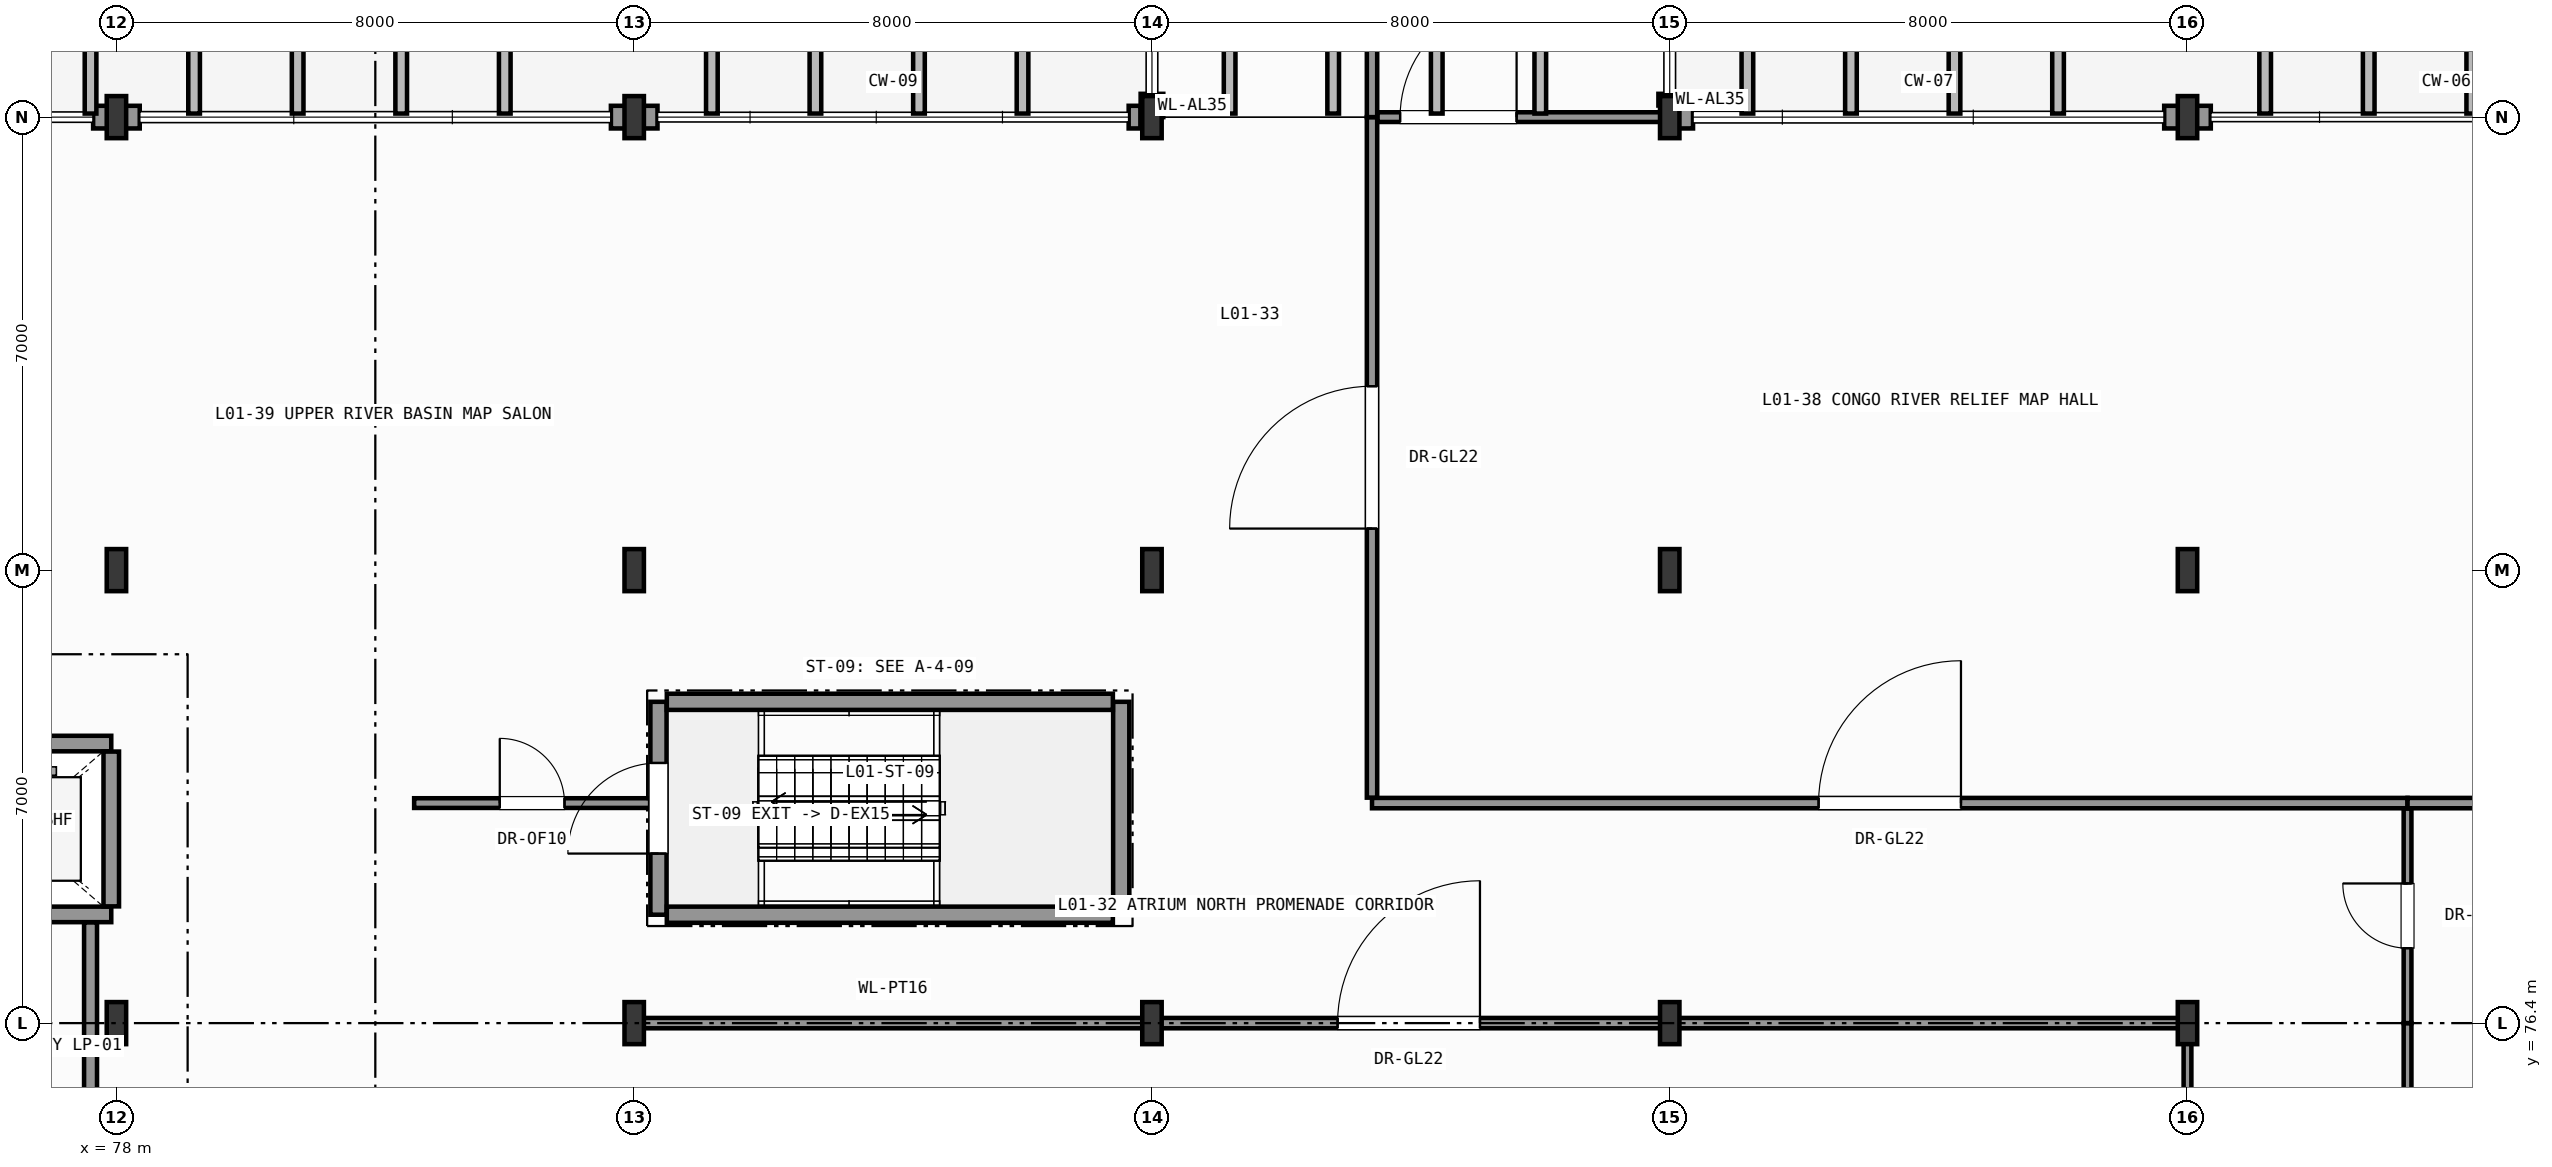
"""IFC4 building model, lengths in metres.
Left out: names, types, materials, properties, quantities, classifications, styles, units other than length and angle.
Written with IfcOpenShell. Run it as: python <this file> out.ifc"""

import sys

from ifc_helpers import new_model, si_unit, direction, frame, frame_2d, origin, origin_2d, place, context, subcontext, project, spatial, rectangle, i_section, extrude, element, fill, save


model = new_model("IFC4")
c1 = context("Model", 3, precision=1e-05, world=origin(), true_north=direction((0.0, 1.0)))
c2 = subcontext(c1, "Body", "Model", "MODEL_VIEW")
j1 = project(units=[si_unit("LENGTHUNIT", "METRE"), si_unit("PLANEANGLEUNIT", "RADIAN")], contexts=[c1])
p1 = place(None, origin())
s1 = spatial("IfcSite", under=j1, at=p1, CompositionType="ELEMENT")
p2 = place(p1, origin())
s2 = spatial("IfcBuilding", under=s1, at=p2, CompositionType="ELEMENT")
p3 = place(p2, origin())
s3 = spatial("IfcBuildingStorey", under=s2, at=p3, CompositionType="ELEMENT", Elevation=0.0)
for number, where, z_axis, x_axis in (
    (1, (78.0, 76.4, 0.0), (0.0, 0.0, 1.0), (1.0, 0.0, 0.0)),
    (2, (78.0, 83.4, 0.0), (0.0, 0.0, 1.0), (1.0, 0.0, 0.0)),
    (3, (78.0, 90.4, 0.0), (0.0, 0.0, 1.0), (1.0, 0.0, 0.0)),
    (4, (86.0, 76.4, 0.0), (0.0, 0.0, 1.0), (1.0, 0.0, 0.0)),
    (5, (86.0, 83.4, 0.0), (0.0, 0.0, 1.0), (1.0, 0.0, 0.0)),
    (6, (86.0, 90.4, 0.0), (0.0, 0.0, 1.0), (1.0, 0.0, 0.0)),
    (7, (94.0, 76.4, 0.0), (0.0, 0.0, 1.0), (1.0, 0.0, 0.0)),
    (8, (94.0, 83.4, 0.0), (0.0, 0.0, 1.0), (1.0, 0.0, 0.0)),
    (9, (94.0, 90.4, 0.0), (0.0, 0.0, 1.0), (1.0, 0.0, 0.0)),
    (10, (102.0, 76.4, 0.0), (0.0, 0.0, 1.0), (1.0, 0.0, 0.0)),
    (11, (102.0, 83.4, 0.0), (0.0, 0.0, 1.0), (1.0, 0.0, 0.0)),
    (12, (102.0, 90.4, 0.0), (0.0, 0.0, 1.0), (1.0, 0.0, 0.0)),
    (13, (110.0, 76.4, 0.0), (0.0, 0.0, 1.0), (1.0, 0.0, 0.0)),
    (14, (110.0, 83.4, 0.0), (0.0, 0.0, 1.0), (1.0, 0.0, 0.0)),
    (15, (110.0, 90.4, 0.0), (0.0, 0.0, 1.0), (1.0, 0.0, 0.0)),
):
    element("IfcColumn", number, at=place(p3, frame(where, z_axis=z_axis, x_axis=x_axis)), inside=s3, PredefinedType="COLUMN", context=c2, shape_type="SweptSolid", body=[
        extrude(i_section(OverallWidth=0.3, OverallDepth=0.65, WebThickness=0.016, FlangeThickness=0.031, FilletRadius=0.027, at=origin_2d()), origin(), (0.0, 0.0, 1.0), 7.8),
    ])
for number, where, z_axis, x_axis in (
    (16, (110.36, 90.4, 0.0), (0.0, 0.0, 1.0), (-1.0, 0.0, 0.0)),
    (17, (110.0, 90.4, 0.0), (0.0, 0.0, 1.0), (-1.0, 0.0, 0.0)),
    (18, (102.36, 90.4, 0.0), (0.0, 0.0, 1.0), (-1.0, 0.0, 0.0)),
):
    element("IfcWall", number, at=place(p3, frame(where, z_axis=z_axis, x_axis=x_axis)), inside=s3, PredefinedType="SOLIDWALL", context=c2, shape_type="SweptSolid", body=[
        extrude(rectangle(XDim=0.36, YDim=0.35, at=frame_2d((0.18, 0.0))), origin(), (0.0, 0.0, 1.0), 7.135),
    ])
p4 = place(p3, frame((102.0, 90.579, 0.0), z_axis=(0.0, 0.0, 1.0), x_axis=(0.0, 1.0, 0.0)))
e19 = element("IfcWall", 19, at=p4, inside=s3, PredefinedType="SOLIDWALL", context=c2, shape_type="SweptSolid", body=[
    extrude(rectangle(XDim=0.181, YDim=0.35, at=frame_2d((0.09, 0.0))), origin(), (0.0, 0.0, 1.0), 7.54),
])
p5 = place(p3, frame((94.0, 90.76, 0.0), z_axis=(0.0, 0.0, 1.0), x_axis=(0.0, -1.0, 0.0)))
e20 = element("IfcWall", 20, at=p5, inside=s3, PredefinedType="SOLIDWALL", context=c2, shape_type="SweptSolid", body=[
    extrude(rectangle(XDim=0.36, YDim=0.35, at=frame_2d((0.18, 0.0))), origin(), (0.0, 0.0, 1.0), 7.025),
])
p6 = place(p3, frame((93.821, 90.4, 0.0), z_axis=(0.0, 0.0, 1.0), x_axis=(-1.0, 0.0, 0.0)))
e21 = element("IfcWall", 21, at=p6, inside=s3, PredefinedType="SOLIDWALL", context=c2, shape_type="SweptSolid", body=[
    extrude(rectangle(XDim=0.181, YDim=0.35, at=frame_2d((0.091, 0.0))), origin(), (0.0, 0.0, 1.0), 7.54),
])
for number, where, z_axis, x_axis in (
    (22, (86.36, 90.4, 0.0), (0.0, 0.0, 1.0), (-1.0, 0.0, 0.0)),
    (23, (86.0, 90.4, 0.0), (0.0, 0.0, 1.0), (-1.0, 0.0, 0.0)),
    (24, (78.36, 90.4, 0.0), (0.0, 0.0, 1.0), (-1.0, 0.0, 0.0)),
    (25, (78.0, 90.4, 0.0), (0.0, 0.0, 1.0), (-1.0, 0.0, 0.0)),
):
    element("IfcWall", number, at=place(p3, frame(where, z_axis=z_axis, x_axis=x_axis)), inside=s3, PredefinedType="SOLIDWALL", context=c2, shape_type="SweptSolid", body=[
        extrude(rectangle(XDim=0.36, YDim=0.35, at=frame_2d((0.18, 0.0))), origin(), (0.0, 0.0, 1.0), 7.135),
    ])
p7 = place(p3, frame((86.375, 78.075, 0.0), z_axis=(0.0, 0.0, 1.0), x_axis=(0.0, 1.0, 0.0)))
e26 = element("IfcWall", 26, at=p7, inside=s3, PredefinedType="SHEAR", context=c2, shape_type="SweptSolid", body=[
    extrude(rectangle(XDim=3.29, YDim=0.25, at=frame_2d((1.645, 0.0))), origin(), (0.0, 0.0, 1.0), 7.54),
])
p8 = place(p7, frame((0.945, 0.0, 0.0)))
e27 = element("IfcOpeningElement", 27, at=p8, cuts=e26, PredefinedType="OPENING", context=c2, shape_type="SweptSolid", body=[
    extrude(rectangle(XDim=1.4, YDim=2.2, at=frame_2d((0.7, 1.1))), frame((0.0, 0.135, 0.0), z_axis=(0.0, -1.0, 0.0), x_axis=(1.0, 0.0, 0.0)), (0.0, 0.0, 1.0), 0.27),
])
p9 = place(p3, frame((93.525, 78.075, 0.0), z_axis=(0.0, 0.0, 1.0), x_axis=(0.0, 1.0, 0.0)))
e28 = element("IfcWall", 28, at=p9, inside=s3, PredefinedType="SHEAR", context=c2, shape_type="SweptSolid", body=[
    extrude(rectangle(XDim=3.29, YDim=0.25, at=frame_2d((1.645, 0.0))), origin(), (0.0, 0.0, 1.0), 7.54),
])
for number, where, z_axis, x_axis in (
    (29, (86.504, 78.075, 0.0), (0.0, 0.0, 1.0), (1.0, 0.0, 0.0)),
    (30, (86.504, 81.365, 0.0), (0.0, 0.0, 1.0), (1.0, 0.0, 0.0)),
):
    element("IfcWall", number, at=place(p3, frame(where, z_axis=z_axis, x_axis=x_axis)), inside=s3, PredefinedType="SHEAR", context=c2, shape_type="SweptSolid", body=[
        extrude(rectangle(XDim=6.892, YDim=0.25, at=frame_2d((3.446, 0.0))), origin(), (0.0, 0.0, 1.0), 7.54),
    ])
p10 = place(p3, frame((74.88, 78.08, 0.0), z_axis=(0.0, 0.0, 1.0), x_axis=(1.0, 0.0, 0.0)))
e31 = element("IfcWall", 31, at=p10, inside=s3, PredefinedType="SHEAR", context=c2, shape_type="SweptSolid", body=[
    extrude(rectangle(XDim=3.04, YDim=0.24, at=frame_2d((1.52, 0.0))), origin(), (0.0, 0.0, 1.0), 7.54),
])
p11 = place(p10, frame((0.97, 0.0, 0.0)))
e32 = element("IfcOpeningElement", 32, at=p11, cuts=e31, PredefinedType="OPENING", context=c2, shape_type="SweptSolid", body=[
    extrude(rectangle(XDim=1.1, YDim=2.2, at=frame_2d((0.55, 1.1))), frame((0.0, 0.13, 0.0), z_axis=(0.0, -1.0, 0.0), x_axis=(1.0, 0.0, 0.0)), (0.0, 0.0, 1.0), 0.26),
])
p12 = place(p3, frame((74.88, 80.72, 0.0), z_axis=(0.0, 0.0, 1.0), x_axis=(1.0, 0.0, 0.0)))
e33 = element("IfcWall", 33, at=p12, inside=s3, PredefinedType="SHEAR", context=c2, shape_type="SweptSolid", body=[
    extrude(rectangle(XDim=3.04, YDim=0.24, at=frame_2d((1.52, 0.0))), origin(), (0.0, 0.0, 1.0), 7.54),
])
p13 = place(p3, frame((77.92, 78.204, 0.0), z_axis=(0.0, 0.0, 1.0), x_axis=(0.0, 1.0, 0.0)))
e34 = element("IfcWall", 34, at=p13, inside=s3, PredefinedType="SHEAR", context=c2, shape_type="SweptSolid", body=[
    extrude(rectangle(XDim=2.392, YDim=0.24, at=frame_2d((1.196, 0.0))), origin(), (0.0, 0.0, 1.0), 7.54),
])
p14 = place(p3, frame((77.6, 74.304, 0.0), z_axis=(0.0, 0.0, 1.0), x_axis=(0.0, 1.0, 0.0)))
e35 = element("IfcWall", 35, at=p14, inside=s3, PredefinedType="PARTITIONING", context=c2, shape_type="SweptSolid", body=[
    extrude(rectangle(XDim=3.652, YDim=0.2, at=frame_2d((1.826, 0.0))), origin(), (0.0, 0.0, 1.0), 7.54),
])
p15 = place(p3, frame((110.0, 59.679, 0.0), z_axis=(0.0, 0.0, 1.0), x_axis=(0.0, 1.0, 0.0)))
e36 = element("IfcWall", 36, at=p15, inside=s3, PredefinedType="PARTITIONING", context=c2, shape_type="SweptSolid", body=[
    extrude(rectangle(XDim=16.721, YDim=0.12, at=frame_2d((8.36, 0.0))), origin(), (0.0, 0.0, 1.0), 7.085),
])
p16 = place(p15, frame((1.768, 0.0, 0.0)))
e37 = element("IfcOpeningElement", 37, at=p16, cuts=e36, PredefinedType="OPENING", context=c2, shape_type="SweptSolid", body=[
    extrude(rectangle(XDim=2.2, YDim=2.6, at=frame_2d((1.1, 1.3))), frame((0.0, 0.07, 0.0), z_axis=(0.0, -1.0, 0.0), x_axis=(1.0, 0.0, 0.0)), (0.0, 0.0, 1.0), 0.14),
])
p17 = place(p3, frame((86.0, 76.4, 0.0), z_axis=(0.0, 0.0, 1.0), x_axis=(1.0, 0.0, 0.0)))
e38 = element("IfcWall", 38, at=p17, inside=s3, PredefinedType="PARTITIONING", context=c2, shape_type="SweptSolid", body=[
    extrude(rectangle(XDim=23.936, YDim=0.16, at=frame_2d((11.968, 0.0))), origin(), (0.0, 0.0, 1.0), 7.135),
])
p18 = place(p17, frame((10.868, 0.0, 0.0)))
e39 = element("IfcOpeningElement", 39, at=p18, cuts=e38, PredefinedType="OPENING", context=c2, shape_type="SweptSolid", body=[
    extrude(rectangle(XDim=2.2, YDim=2.6, at=frame_2d((1.1, 1.3))), frame((0.0, 0.09, 0.0), z_axis=(0.0, -1.0, 0.0), x_axis=(1.0, 0.0, 0.0)), (0.0, 0.0, 1.0), 0.18),
])
p19 = place(p3, frame((113.4, 71.6, 0.0), z_axis=(0.0, 0.0, 1.0), x_axis=(0.0, 1.0, 0.0)))
e40 = element("IfcWall", 40, at=p19, inside=s3, PredefinedType="PARTITIONING", context=c2, shape_type="SweptSolid", body=[
    extrude(rectangle(XDim=4.8, YDim=0.12, at=frame_2d((2.4, 0.0))), origin(), (0.0, 0.0, 1.0), 7.54),
])
p20 = place(p19, frame((1.5, 0.0, 0.0)))
e41 = element("IfcOpeningElement", 41, at=p20, cuts=e40, PredefinedType="OPENING", context=c2, shape_type="SweptSolid", body=[
    extrude(rectangle(XDim=1.8, YDim=2.4, at=frame_2d((0.9, 1.2))), frame((0.0, 0.07, 0.0), z_axis=(0.0, -1.0, 0.0), x_axis=(1.0, 0.0, 0.0)), (0.0, 0.0, 1.0), 0.14),
])
p21 = place(p3, frame((97.4, 79.8, 0.0), z_axis=(0.0, 0.0, 1.0), x_axis=(1.0, 0.0, 0.0)))
e42 = element("IfcWall", 42, at=p21, inside=s3, PredefinedType="PARTITIONING", context=c2, shape_type="SweptSolid", body=[
    extrude(rectangle(XDim=16.0, YDim=0.16, at=frame_2d((8.0, 0.0))), origin(), (0.0, 0.0, 1.0), 7.165),
])
p22 = place(p21, frame((6.9, 0.0, 0.0)))
e43 = element("IfcOpeningElement", 43, at=p22, cuts=e42, PredefinedType="OPENING", context=c2, shape_type="SweptSolid", body=[
    extrude(rectangle(XDim=2.2, YDim=2.6, at=frame_2d((1.1, 1.3))), frame((0.0, 0.09, 0.0), z_axis=(0.0, -1.0, 0.0), x_axis=(1.0, 0.0, 0.0)), (0.0, 0.0, 1.0), 0.18),
])
p23 = place(p3, frame((82.6, 79.8, 0.0), z_axis=(0.0, 0.0, 1.0), x_axis=(1.0, 0.0, 0.0)))
e44 = element("IfcWall", 44, at=p23, inside=s3, PredefinedType="PARTITIONING", context=c2, shape_type="SweptSolid", body=[
    extrude(rectangle(XDim=3.646, YDim=0.15, at=frame_2d((1.823, 0.0))), origin(), (0.0, 0.0, 1.0), 7.195),
])
p24 = place(p23, frame((1.323, 0.0, 0.0)))
e45 = element("IfcOpeningElement", 45, at=p24, cuts=e44, PredefinedType="OPENING", context=c2, shape_type="SweptSolid", body=[
    extrude(rectangle(XDim=1.0, YDim=2.15, at=frame_2d((0.5, 1.075))), frame((0.0, 0.085, 0.0), z_axis=(0.0, -1.0, 0.0), x_axis=(1.0, 0.0, 0.0)), (0.0, 0.0, 1.0), 0.17),
])
p25 = place(p3, frame((113.4, 76.4, 0.0), z_axis=(0.0, 0.0, 1.0), x_axis=(0.0, 1.0, 0.0)))
e46 = element("IfcWall", 46, at=p25, inside=s3, PredefinedType="PARTITIONING", context=c2, shape_type="SweptSolid", body=[
    extrude(rectangle(XDim=3.316, YDim=0.12, at=frame_2d((1.658, 0.0))), origin(), (0.0, 0.0, 1.0), 7.54),
])
p26 = place(p25, frame((1.158, 0.0, 0.0)))
e47 = element("IfcOpeningElement", 47, at=p26, cuts=e46, PredefinedType="OPENING", context=c2, shape_type="SweptSolid", body=[
    extrude(rectangle(XDim=1.0, YDim=2.15, at=frame_2d((0.5, 1.075))), frame((0.0, 0.07, 0.0), z_axis=(0.0, -1.0, 0.0), x_axis=(1.0, 0.0, 0.0)), (0.0, 0.0, 1.0), 0.14),
])
p27 = place(p3, frame((97.4, 79.884, 0.0), z_axis=(0.0, 0.0, 1.0), x_axis=(0.0, 1.0, 0.0)))
e48 = element("IfcWall", 48, at=p27, inside=s3, PredefinedType="PARTITIONING", context=c2, shape_type="SweptSolid", body=[
    extrude(rectangle(XDim=10.516, YDim=0.16, at=frame_2d((5.258, 0.0))), origin(), (0.0, 0.0, 1.0), 7.54),
])
p28 = place(p27, frame((4.158, 0.0, 0.0)))
e49 = element("IfcOpeningElement", 49, at=p28, cuts=e48, PredefinedType="OPENING", context=c2, shape_type="SweptSolid", body=[
    extrude(rectangle(XDim=2.2, YDim=2.6, at=frame_2d((1.1, 1.3))), frame((0.0, 0.09, 0.0), z_axis=(0.0, -1.0, 0.0), x_axis=(1.0, 0.0, 0.0)), (0.0, 0.0, 1.0), 0.18),
])
p29 = place(p3, frame((113.4, 79.8, 0.0), z_axis=(0.0, 0.0, 1.0), x_axis=(1.0, 0.0, 0.0)))
e50 = element("IfcWall", 50, at=p29, inside=s3, PredefinedType="PARTITIONING", context=c2, shape_type="SweptSolid", body=[
    extrude(rectangle(XDim=12.6, YDim=0.16, at=frame_2d((6.3, 0.0))), origin(), (0.0, 0.0, 1.0), 7.165),
])
p30 = place(p29, frame((5.2, 0.0, 0.0)))
e51 = element("IfcOpeningElement", 51, at=p30, cuts=e50, PredefinedType="OPENING", context=c2, shape_type="SweptSolid", body=[
    extrude(rectangle(XDim=2.2, YDim=2.6, at=frame_2d((1.1, 1.3))), frame((0.0, 0.09, 0.0), z_axis=(0.0, -1.0, 0.0), x_axis=(1.0, 0.0, 0.0)), (0.0, 0.0, 1.0), 0.18),
])
p31 = place(p3, frame((97.484, 90.4, 0.0), z_axis=(0.0, 0.0, 1.0), x_axis=(1.0, 0.0, 0.0)))
e52 = element("IfcWall", 52, at=p31, inside=s3, PredefinedType="PARTITIONING", context=c2, shape_type="SweptSolid", body=[
    extrude(rectangle(XDim=4.516, YDim=0.15, at=frame_2d((2.258, 0.0))), origin(), (0.0, 0.0, 1.0), 7.135),
])
p32 = place(p31, frame((0.35, 0.0, 0.0)))
e53 = element("IfcOpeningElement", 53, at=p32, cuts=e52, PredefinedType="OPENING", context=c2, shape_type="SweptSolid", body=[
    extrude(rectangle(XDim=1.8, YDim=2.4, at=frame_2d((0.9, 1.2))), frame((0.0, 0.085, 0.0), z_axis=(0.0, -1.0, 0.0), x_axis=(1.0, 0.0, 0.0)), (0.0, 0.0, 1.0), 0.17),
])
p33 = place(p3, frame((97.4, 90.4, 0.0), z_axis=(0.0, 0.0, 1.0), x_axis=(0.0, 1.0, 0.0)))
e54 = element("IfcWall", 54, at=p33, inside=s3, PredefinedType="PARTITIONING", context=c2, shape_type="SweptSolid", body=[
    extrude(rectangle(XDim=30.4, YDim=0.16, at=frame_2d((15.2, 0.0))), origin(), (0.0, 0.0, 1.0), 7.54),
])
p34 = place(p33, frame((14.1, 0.0, 0.0)))
e55 = element("IfcOpeningElement", 55, at=p34, cuts=e54, PredefinedType="OPENING", context=c2, shape_type="SweptSolid", body=[
    extrude(rectangle(XDim=2.2, YDim=2.6, at=frame_2d((1.1, 1.3))), frame((0.0, 0.09, 0.0), z_axis=(0.0, -1.0, 0.0), x_axis=(1.0, 0.0, 0.0)), (0.0, 0.0, 1.0), 0.18),
])
p35 = place(p8, origin())
e56 = element("IfcDoor", 56, at=p35, inside=s3, OperationType="SINGLE_SWING_LEFT", PredefinedType="DOOR", context=c2, shape_type="SweptSolid", body=[
    extrude(rectangle(XDim=1.4, YDim=2.2, at=frame_2d((0.7, 1.1))), frame((0.0, 0.025, 0.0), z_axis=(0.0, -1.0, 0.0), x_axis=(1.0, 0.0, 0.0)), (0.0, 0.0, 1.0), 0.05),
])
fill(e27, e56)
p36 = place(p18, origin())
e57 = element("IfcDoor", 57, at=p36, inside=s3, OperationType="SINGLE_SWING_RIGHT", PredefinedType="DOOR", context=c2, shape_type="SweptSolid", body=[
    extrude(rectangle(XDim=2.2, YDim=2.6, at=frame_2d((1.1, 1.3))), frame((0.0, 0.025, 0.0), z_axis=(0.0, -1.0, 0.0), x_axis=(1.0, 0.0, 0.0)), (0.0, 0.0, 1.0), 0.05),
])
fill(e39, e57)
p37 = place(p22, origin())
e58 = element("IfcDoor", 58, at=p37, inside=s3, OperationType="SINGLE_SWING_RIGHT", PredefinedType="DOOR", context=c2, shape_type="SweptSolid", body=[
    extrude(rectangle(XDim=2.2, YDim=2.6, at=frame_2d((1.1, 1.3))), frame((0.0, 0.025, 0.0), z_axis=(0.0, -1.0, 0.0), x_axis=(1.0, 0.0, 0.0)), (0.0, 0.0, 1.0), 0.05),
])
fill(e43, e58)
p38 = place(p24, origin())
e59 = element("IfcDoor", 59, at=p38, inside=s3, OperationType="SINGLE_SWING_LEFT", PredefinedType="DOOR", context=c2, shape_type="SweptSolid", body=[
    extrude(rectangle(XDim=1.0, YDim=2.15, at=frame_2d((0.5, 1.075))), frame((0.0, 0.025, 0.0), z_axis=(0.0, -1.0, 0.0), x_axis=(1.0, 0.0, 0.0)), (0.0, 0.0, 1.0), 0.05),
])
fill(e45, e59)
p39 = place(p26, origin())
e60 = element("IfcDoor", 60, at=p39, inside=s3, OperationType="SINGLE_SWING_RIGHT", PredefinedType="DOOR", context=c2, shape_type="SweptSolid", body=[
    extrude(rectangle(XDim=1.0, YDim=2.15, at=frame_2d((0.5, 1.075))), frame((0.0, 0.025, 0.0), z_axis=(0.0, -1.0, 0.0), x_axis=(1.0, 0.0, 0.0)), (0.0, 0.0, 1.0), 0.05),
])
fill(e47, e60)
p40 = place(p28, origin())
e61 = element("IfcDoor", 61, at=p40, inside=s3, OperationType="SINGLE_SWING_LEFT", PredefinedType="DOOR", context=c2, shape_type="SweptSolid", body=[
    extrude(rectangle(XDim=2.2, YDim=2.6, at=frame_2d((1.1, 1.3))), frame((0.0, 0.025, 0.0), z_axis=(0.0, -1.0, 0.0), x_axis=(1.0, 0.0, 0.0)), (0.0, 0.0, 1.0), 0.05),
])
fill(e49, e61)
p41 = place(p32, origin())
e62 = element("IfcDoor", 62, at=p41, inside=s3, OperationType="SINGLE_SWING_RIGHT", PredefinedType="DOOR", context=c2, shape_type="SweptSolid", body=[
    extrude(rectangle(XDim=1.8, YDim=2.4, at=frame_2d((0.9, 1.2))), frame((0.0, 0.025, 0.0), z_axis=(0.0, -1.0, 0.0), x_axis=(1.0, 0.0, 0.0)), (0.0, 0.0, 1.0), 0.05),
])
fill(e53, e62)
save(model, sys.argv[1])
